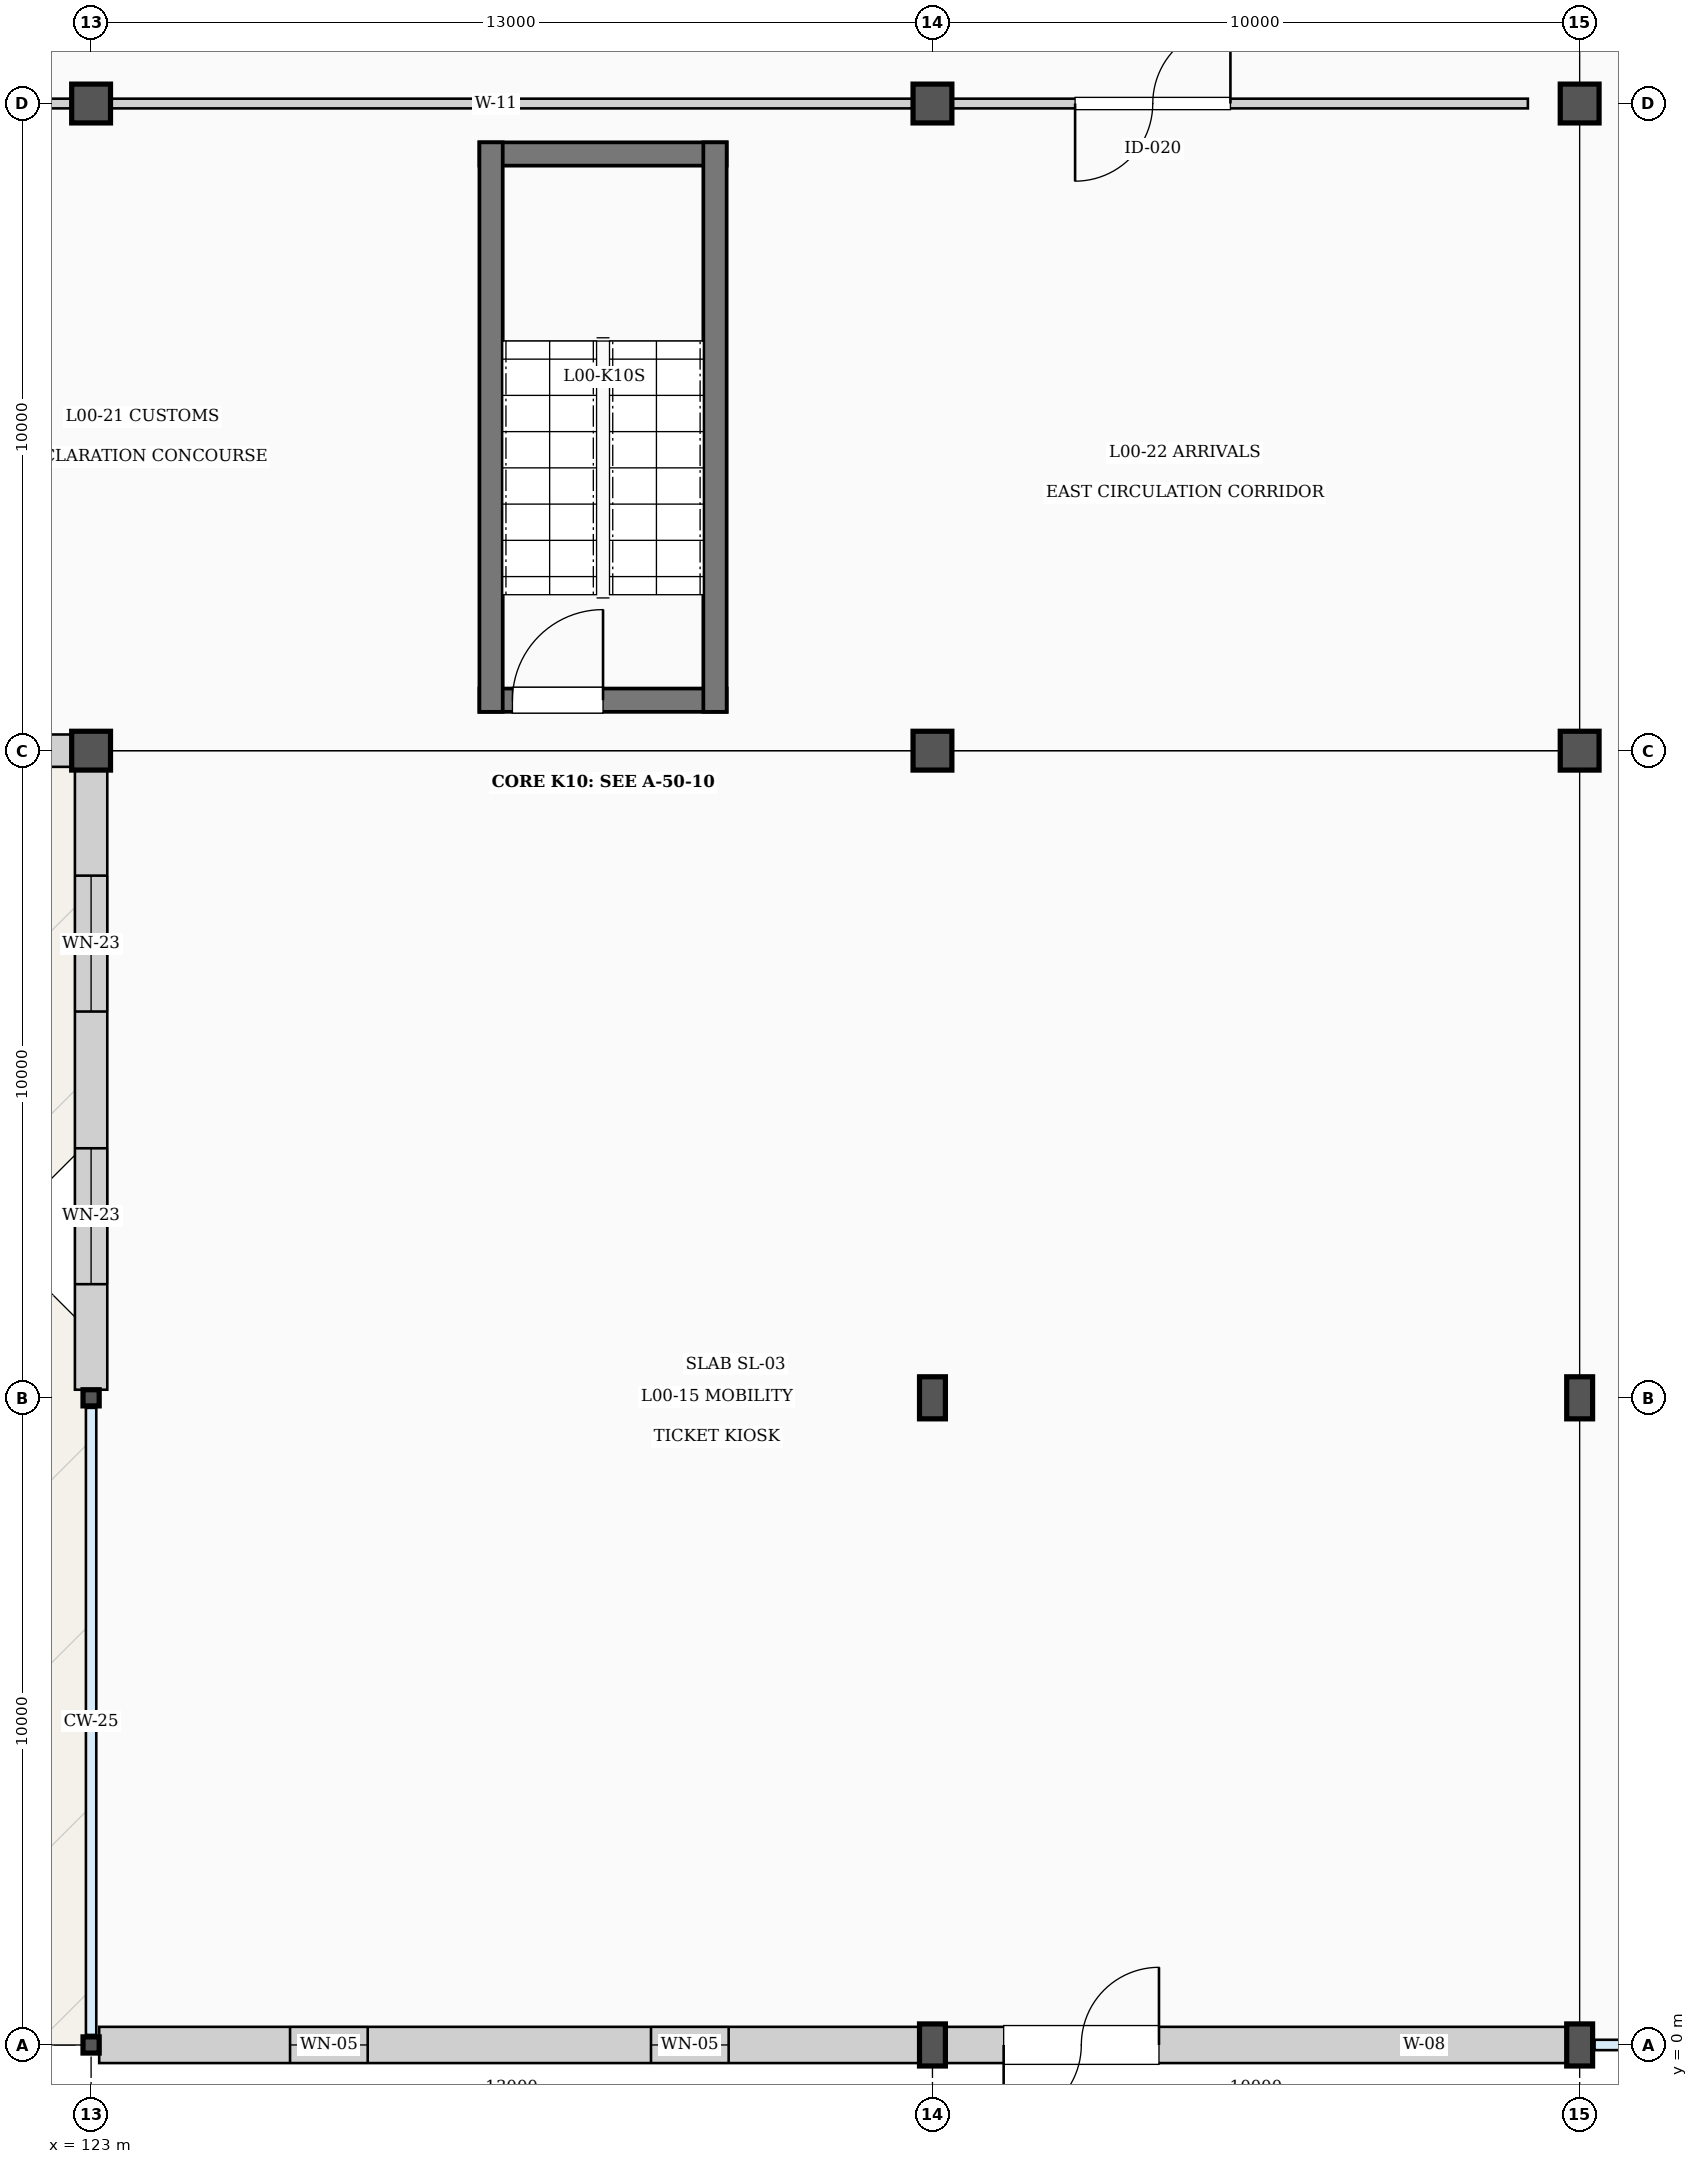
"""IFC4 building model, lengths in metres.
Left out: names, types, materials, properties, quantities, classifications, styles, units other than length and angle.
Written with IfcOpenShell. Run it as: python <this file> out.ifc"""

import sys

from ifc_helpers import new_model, si_unit, direction, frame, frame_2d, origin, origin_2d, place, context, subcontext, project, spatial, rectangle, hollow_rectangle, extrude, element, fill, save


model = new_model("IFC4")
c1 = context("Model", 3, precision=1e-05, world=origin(), true_north=direction((0.0, 1.0)))
c2 = subcontext(c1, "Body", "Model", "MODEL_VIEW")
j1 = project(units=[si_unit("LENGTHUNIT", "METRE"), si_unit("PLANEANGLEUNIT", "RADIAN")], contexts=[c1])
p1 = place(None, origin())
s1 = spatial("IfcSite", under=j1, at=p1, CompositionType="ELEMENT")
p2 = place(p1, origin())
s2 = spatial("IfcBuilding", under=s1, at=p2, CompositionType="ELEMENT")
p3 = place(p2, origin())
s3 = spatial("IfcBuildingStorey", under=s2, at=p3, CompositionType="ELEMENT", Elevation=0.0)
for number, where, z_axis, x_axis in (
    (1, (123.0, 0.0, 0.0), (0.0, 0.0, 1.0), (1.0, 0.0, 0.0)),
    (2, (123.0, 10.0, 0.0), (0.0, 0.0, 1.0), (1.0, 0.0, 0.0)),
):
    element("IfcColumn", number, at=place(p3, frame(where, z_axis=z_axis, x_axis=x_axis)), inside=s3, PredefinedType="COLUMN", context=c2, shape_type="SweptSolid", body=[
        extrude(hollow_rectangle(XDim=0.25, YDim=0.25, WallThickness=0.012, InnerFilletRadius=0.012, OuterFilletRadius=0.019, at=origin_2d()), origin(), (0.0, 0.0, 1.0), 5.4),
    ])
for number, where, z_axis, x_axis in (
    (3, (123.0, 20.0, 0.0), (0.0, 0.0, 1.0), (1.0, 0.0, 0.0)),
    (4, (123.0, 30.0, 0.0), (0.0, 0.0, 1.0), (1.0, 0.0, 0.0)),
):
    element("IfcColumn", number, at=place(p3, frame(where, z_axis=z_axis, x_axis=x_axis)), inside=s3, PredefinedType="COLUMN", context=c2, shape_type="SweptSolid", body=[
        extrude(rectangle(XDim=0.6, YDim=0.6, at=origin_2d()), origin(), (0.0, 0.0, 1.0), 5.4),
    ])
for number, where, z_axis, x_axis in (
    (5, (136.0, 0.0, 0.0), (0.0, 0.0, 1.0), (1.0, 0.0, 0.0)),
    (6, (136.0, 10.0, 0.0), (0.0, 0.0, 1.0), (1.0, 0.0, 0.0)),
):
    element("IfcColumn", number, at=place(p3, frame(where, z_axis=z_axis, x_axis=x_axis)), inside=s3, PredefinedType="COLUMN", context=c2, shape_type="SweptSolid", body=[
        extrude(rectangle(XDim=0.4, YDim=0.65, at=origin_2d()), origin(), (0.0, 0.0, 1.0), 5.4),
    ])
for number, where, z_axis, x_axis in (
    (7, (136.0, 20.0, 0.0), (0.0, 0.0, 1.0), (1.0, 0.0, 0.0)),
    (8, (136.0, 30.0, 0.0), (0.0, 0.0, 1.0), (1.0, 0.0, 0.0)),
):
    element("IfcColumn", number, at=place(p3, frame(where, z_axis=z_axis, x_axis=x_axis)), inside=s3, PredefinedType="COLUMN", context=c2, shape_type="SweptSolid", body=[
        extrude(rectangle(XDim=0.6, YDim=0.6, at=origin_2d()), origin(), (0.0, 0.0, 1.0), 5.4),
    ])
for number, where, z_axis, x_axis in (
    (9, (146.0, 0.0, 0.0), (0.0, 0.0, 1.0), (1.0, 0.0, 0.0)),
    (10, (146.0, 10.0, 0.0), (0.0, 0.0, 1.0), (1.0, 0.0, 0.0)),
):
    element("IfcColumn", number, at=place(p3, frame(where, z_axis=z_axis, x_axis=x_axis)), inside=s3, PredefinedType="COLUMN", context=c2, shape_type="SweptSolid", body=[
        extrude(rectangle(XDim=0.4, YDim=0.65, at=origin_2d()), origin(), (0.0, 0.0, 1.0), 5.4),
    ])
for number, where, z_axis, x_axis in (
    (11, (146.0, 20.0, 0.0), (0.0, 0.0, 1.0), (1.0, 0.0, 0.0)),
    (12, (146.0, 30.0, 0.0), (0.0, 0.0, 1.0), (1.0, 0.0, 0.0)),
):
    element("IfcColumn", number, at=place(p3, frame(where, z_axis=z_axis, x_axis=x_axis)), inside=s3, PredefinedType="COLUMN", context=c2, shape_type="SweptSolid", body=[
        extrude(rectangle(XDim=0.6, YDim=0.6, at=origin_2d()), origin(), (0.0, 0.0, 1.0), 5.4),
    ])
p4 = place(p3, frame((123.125, 0.0, 0.0), z_axis=(0.0, 0.0, 1.0), x_axis=(1.0, 0.0, 0.0)))
e13 = element("IfcWall", 13, at=p4, inside=s3, PredefinedType="SOLIDWALL", context=c2, shape_type="SweptSolid", body=[
    extrude(rectangle(XDim=12.675, YDim=0.56, at=frame_2d((6.337, 0.0))), origin(), (0.0, 0.0, 1.0), 4.58),
])
p5 = place(p4, frame((2.949, 0.0, 0.9)))
e14 = element("IfcOpeningElement", 14, at=p5, cuts=e13, PredefinedType="OPENING", context=c2, shape_type="SweptSolid", body=[
    extrude(rectangle(XDim=1.2, YDim=1.5, at=frame_2d((0.6, 0.75))), frame((0.0, 0.29, 0.0), z_axis=(0.0, -1.0, 0.0), x_axis=(1.0, 0.0, 0.0)), (0.0, 0.0, 1.0), 0.58),
])
p6 = place(p4, frame((8.526, 0.0, 0.9)))
e15 = element("IfcOpeningElement", 15, at=p6, cuts=e13, PredefinedType="OPENING", context=c2, shape_type="SweptSolid", body=[
    extrude(rectangle(XDim=1.2, YDim=1.5, at=frame_2d((0.6, 0.75))), frame((0.0, 0.29, 0.0), z_axis=(0.0, -1.0, 0.0), x_axis=(1.0, 0.0, 0.0)), (0.0, 0.0, 1.0), 0.58),
])
p7 = place(p3, frame((136.2, 0.0, 0.0), z_axis=(0.0, 0.0, 1.0), x_axis=(1.0, 0.0, 0.0)))
e16 = element("IfcWall", 16, at=p7, inside=s3, PredefinedType="SOLIDWALL", context=c2, shape_type="SweptSolid", body=[
    extrude(rectangle(XDim=9.6, YDim=0.56, at=frame_2d((4.8, 0.0))), origin(), (0.0, 0.0, 1.0), 4.58),
])
p8 = place(p7, frame((0.9, 0.0, 0.0)))
e17 = element("IfcOpeningElement", 17, at=p8, cuts=e16, PredefinedType="OPENING", context=c2, shape_type="SweptSolid", body=[
    extrude(rectangle(XDim=2.4, YDim=2.5, at=frame_2d((1.2, 1.25))), frame((0.0, 0.29, 0.0), z_axis=(0.0, -1.0, 0.0), x_axis=(1.0, 0.0, 0.0)), (0.0, 0.0, 1.0), 0.58),
])
p9 = place(p3, frame((113.125, 20.0, 0.0), z_axis=(0.0, 0.0, 1.0), x_axis=(1.0, 0.0, 0.0)))
e18 = element("IfcWall", 18, at=p9, inside=s3, PredefinedType="SOLIDWALL", context=c2, shape_type="SweptSolid", body=[
    extrude(rectangle(XDim=9.575, YDim=0.5, at=frame_2d((4.788, 0.0))), origin(), (0.0, 0.0, 1.0), 4.54),
])
p10 = place(p9, frame((3.488, 0.0, 0.0)))
e19 = element("IfcOpeningElement", 19, at=p10, cuts=e18, PredefinedType="OPENING", context=c2, shape_type="SweptSolid", body=[
    extrude(rectangle(XDim=2.6, YDim=2.6, at=frame_2d((1.3, 1.3))), frame((0.0, 0.26, 0.0), z_axis=(0.0, -1.0, 0.0), x_axis=(1.0, 0.0, 0.0)), (0.0, 0.0, 1.0), 0.52),
])
p11 = place(p3, frame((123.0, 10.125, 0.0), z_axis=(0.0, 0.0, 1.0), x_axis=(0.0, 1.0, 0.0)))
e20 = element("IfcWall", 20, at=p11, inside=s3, PredefinedType="SOLIDWALL", context=c2, shape_type="SweptSolid", body=[
    extrude(rectangle(XDim=9.575, YDim=0.5, at=frame_2d((4.788, 0.0))), origin(), (0.0, 0.0, 1.0), 4.53),
])
p12 = place(p11, frame((1.631, 0.0, 0.9)))
e21 = element("IfcOpeningElement", 21, at=p12, cuts=e20, PredefinedType="OPENING", context=c2, shape_type="SweptSolid", body=[
    extrude(rectangle(XDim=2.1, YDim=1.5, at=frame_2d((1.05, 0.75))), frame((0.0, 0.26, 0.0), z_axis=(0.0, -1.0, 0.0), x_axis=(1.0, 0.0, 0.0)), (0.0, 0.0, 1.0), 0.52),
])
p13 = place(p11, frame((5.844, 0.0, 0.9)))
e22 = element("IfcOpeningElement", 22, at=p13, cuts=e20, PredefinedType="OPENING", context=c2, shape_type="SweptSolid", body=[
    extrude(rectangle(XDim=2.1, YDim=1.5, at=frame_2d((1.05, 0.75))), frame((0.0, 0.26, 0.0), z_axis=(0.0, -1.0, 0.0), x_axis=(1.0, 0.0, 0.0)), (0.0, 0.0, 1.0), 0.52),
])
p14 = place(p3, frame((129.0, 20.78, 0.0), z_axis=(0.0, 0.0, 1.0), x_axis=(1.0, 0.0, 0.0)))
e23 = element("IfcWall", 23, at=p14, inside=s3, PredefinedType="SHEAR", context=c2, shape_type="SweptSolid", body=[
    extrude(rectangle(XDim=3.82, YDim=0.36, at=frame_2d((1.91, 0.0))), origin(), (0.0, 0.0, 1.0), 5.4),
])
p15 = place(p14, frame((0.51, 0.0, 0.0)))
e24 = element("IfcOpeningElement", 24, at=p15, cuts=e23, PredefinedType="OPENING", context=c2, shape_type="SweptSolid", body=[
    extrude(rectangle(XDim=1.4, YDim=2.35, at=frame_2d((0.7, 1.175))), frame((0.0, 0.19, 0.0), z_axis=(0.0, -1.0, 0.0), x_axis=(1.0, 0.0, 0.0)), (0.0, 0.0, 1.0), 0.38),
])
p16 = place(p3, frame((129.0, 29.22, 0.0), z_axis=(0.0, 0.0, 1.0), x_axis=(1.0, 0.0, 0.0)))
e25 = element("IfcWall", 25, at=p16, inside=s3, PredefinedType="SHEAR", context=c2, shape_type="SweptSolid", body=[
    extrude(rectangle(XDim=3.82, YDim=0.36, at=frame_2d((1.91, 0.0))), origin(), (0.0, 0.0, 1.0), 5.4),
])
for number, where, z_axis, x_axis in (
    (26, (129.18, 20.6, 0.0), (0.0, 0.0, 1.0), (0.0, 1.0, 0.0)),
    (27, (132.64, 20.6, 0.0), (0.0, 0.0, 1.0), (0.0, 1.0, 0.0)),
):
    element("IfcWall", number, at=place(p3, frame(where, z_axis=z_axis, x_axis=x_axis)), inside=s3, PredefinedType="SHEAR", context=c2, shape_type="SweptSolid", body=[
        extrude(rectangle(XDim=8.8, YDim=0.36, at=frame_2d((4.4, 0.0))), origin(), (0.0, 0.0, 1.0), 5.4),
    ])
p17 = place(p3, frame((103.8, 30.0, 0.0), z_axis=(0.0, 0.0, 1.0), x_axis=(1.0, 0.0, 0.0)))
e28 = element("IfcWall", 28, at=p17, inside=s3, PredefinedType="PARTITIONING", context=c2, shape_type="SweptSolid", body=[
    extrude(rectangle(XDim=41.4, YDim=0.15, at=frame_2d((20.7, 0.0))), origin(), (0.0, 0.0, 1.0), 4.59),
])
p18 = place(p17, frame((13.504, 0.0, 0.0)))
e29 = element("IfcOpeningElement", 29, at=p18, cuts=e28, PredefinedType="OPENING", context=c2, shape_type="SweptSolid", body=[
    extrude(rectangle(XDim=2.8, YDim=2.7, at=frame_2d((1.4, 1.35))), frame((0.0, 0.085, 0.0), z_axis=(0.0, -1.0, 0.0), x_axis=(1.0, 0.0, 0.0)), (0.0, 0.0, 1.0), 0.17),
])
p19 = place(p17, frame((34.404, 0.0, 0.0)))
e30 = element("IfcOpeningElement", 30, at=p19, cuts=e28, PredefinedType="OPENING", context=c2, shape_type="SweptSolid", body=[
    extrude(rectangle(XDim=2.4, YDim=2.6, at=frame_2d((1.2, 1.3))), frame((0.0, 0.085, 0.0), z_axis=(0.0, -1.0, 0.0), x_axis=(1.0, 0.0, 0.0)), (0.0, 0.0, 1.0), 0.17),
])
p20 = place(p5, origin())
e31 = element("IfcWindow", 31, at=p20, inside=s3, PartitioningType="SINGLE_PANEL", PredefinedType="WINDOW", context=c2, shape_type="SweptSolid", body=[
    extrude(rectangle(XDim=1.2, YDim=1.5, at=frame_2d((0.6, 0.75))), frame((0.0, 0.03, 0.0), z_axis=(0.0, -1.0, 0.0), x_axis=(1.0, 0.0, 0.0)), (0.0, 0.0, 1.0), 0.06),
])
fill(e14, e31)
p21 = place(p6, origin())
e32 = element("IfcWindow", 32, at=p21, inside=s3, PartitioningType="SINGLE_PANEL", PredefinedType="WINDOW", context=c2, shape_type="SweptSolid", body=[
    extrude(rectangle(XDim=1.2, YDim=1.5, at=frame_2d((0.6, 0.75))), frame((0.0, 0.03, 0.0), z_axis=(0.0, -1.0, 0.0), x_axis=(1.0, 0.0, 0.0)), (0.0, 0.0, 1.0), 0.06),
])
fill(e15, e32)
p22 = place(p8, origin())
e33 = element("IfcDoor", 33, at=p22, inside=s3, OperationType="DOUBLE_DOOR_SINGLE_SWING", PredefinedType="DOOR", context=c2, shape_type="SweptSolid", body=[
    extrude(rectangle(XDim=2.4, YDim=2.5, at=frame_2d((1.2, 1.25))), frame((0.0, 0.025, 0.0), z_axis=(0.0, -1.0, 0.0), x_axis=(1.0, 0.0, 0.0)), (0.0, 0.0, 1.0), 0.05),
])
fill(e17, e33)
p23 = place(p12, origin())
e34 = element("IfcWindow", 34, at=p23, inside=s3, PartitioningType="SINGLE_PANEL", PredefinedType="WINDOW", context=c2, shape_type="SweptSolid", body=[
    extrude(rectangle(XDim=2.1, YDim=1.5, at=frame_2d((1.05, 0.75))), frame((0.0, 0.03, 0.0), z_axis=(0.0, -1.0, 0.0), x_axis=(1.0, 0.0, 0.0)), (0.0, 0.0, 1.0), 0.06),
])
fill(e21, e34)
p24 = place(p13, origin())
e35 = element("IfcWindow", 35, at=p24, inside=s3, PartitioningType="SINGLE_PANEL", PredefinedType="WINDOW", context=c2, shape_type="SweptSolid", body=[
    extrude(rectangle(XDim=2.1, YDim=1.5, at=frame_2d((1.05, 0.75))), frame((0.0, 0.03, 0.0), z_axis=(0.0, -1.0, 0.0), x_axis=(1.0, 0.0, 0.0)), (0.0, 0.0, 1.0), 0.06),
])
fill(e22, e35)
p25 = place(p15, origin())
e36 = element("IfcDoor", 36, at=p25, inside=s3, OperationType="SINGLE_SWING_RIGHT", PredefinedType="DOOR", context=c2, shape_type="SweptSolid", body=[
    extrude(rectangle(XDim=1.4, YDim=2.35, at=frame_2d((0.7, 1.175))), frame((0.0, 0.025, 0.0), z_axis=(0.0, -1.0, 0.0), x_axis=(1.0, 0.0, 0.0)), (0.0, 0.0, 1.0), 0.05),
])
fill(e24, e36)
p26 = place(p19, origin())
e37 = element("IfcDoor", 37, at=p26, inside=s3, OperationType="DOUBLE_DOOR_SINGLE_SWING", PredefinedType="DOOR", context=c2, shape_type="SweptSolid", body=[
    extrude(rectangle(XDim=2.4, YDim=2.6, at=frame_2d((1.2, 1.3))), frame((0.0, 0.025, 0.0), z_axis=(0.0, -1.0, 0.0), x_axis=(1.0, 0.0, 0.0)), (0.0, 0.0, 1.0), 0.05),
])
fill(e30, e37)
save(model, sys.argv[1])
